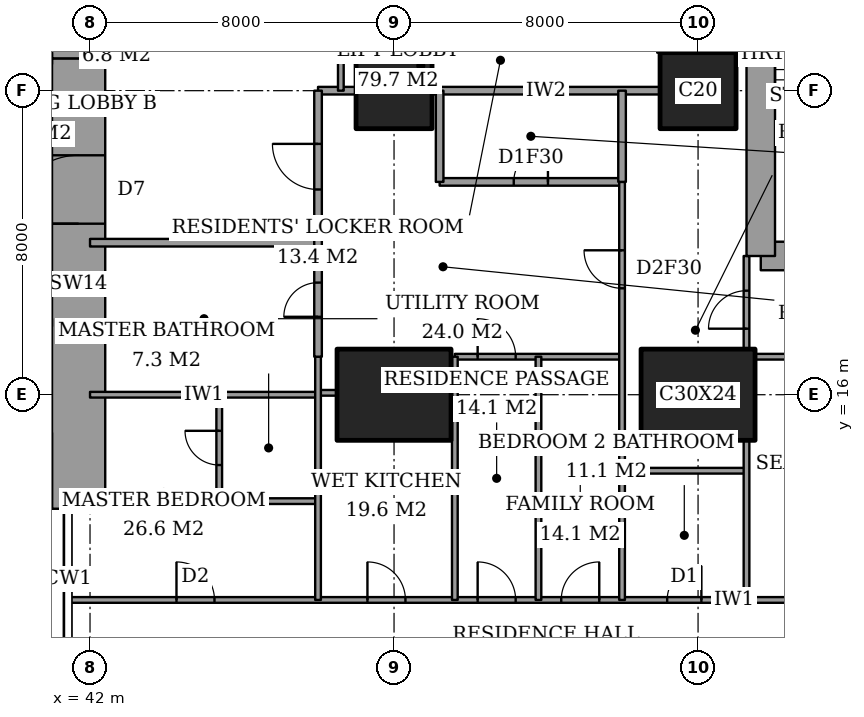
"""IFC4 building model, lengths in metres.
Left out: names, types, materials, properties, quantities, classifications, styles, units other than length and angle.
Written with IfcOpenShell. Run it as: python <this file> out.ifc"""

import sys

from ifc_helpers import new_model, si_unit, direction, frame, frame_2d, origin, origin_2d, place, context, subcontext, project, spatial, rectangle, extrude, element, fill, save


model = new_model("IFC4")
c1 = context("Model", 3, precision=1e-05, world=origin(), true_north=direction((0.0, 1.0)))
c2 = subcontext(c1, "Body", "Model", "MODEL_VIEW")
j1 = project(units=[si_unit("LENGTHUNIT", "METRE"), si_unit("PLANEANGLEUNIT", "RADIAN")], contexts=[c1])
p1 = place(None, origin())
s1 = spatial("IfcSite", under=j1, at=p1, CompositionType="ELEMENT")
p2 = place(p1, origin())
s2 = spatial("IfcBuilding", under=s1, at=p2, CompositionType="ELEMENT")
p3 = place(p2, frame((0.0, 0.0, 80.0)))
s3 = spatial("IfcBuildingStorey", under=s2, at=p3, CompositionType="ELEMENT", Elevation=80.0)
p4 = place(p3, frame((50.0, 16.0, 0.0), z_axis=(0.0, 0.0, 1.0), x_axis=(1.0, 0.0, 0.0)))
e1 = element("IfcColumn", 1, at=p4, inside=s3, PredefinedType="COLUMN", context=c2, shape_type="SweptSolid", body=[
    extrude(rectangle(XDim=3.0, YDim=2.4, at=origin_2d()), origin(), (0.0, 0.0, 1.0), 3.6),
])
p5 = place(p3, frame((50.0, 24.0, 0.0), z_axis=(0.0, 0.0, 1.0), x_axis=(1.0, 0.0, 0.0)))
e2 = element("IfcColumn", 2, at=p5, inside=s3, PredefinedType="COLUMN", context=c2, shape_type="SweptSolid", body=[
    extrude(rectangle(XDim=2.0, YDim=2.0, at=origin_2d()), origin(), (0.0, 0.0, 1.0), 3.6),
])
p6 = place(p3, frame((58.0, 16.0, 0.0), z_axis=(0.0, 0.0, 1.0), x_axis=(1.0, 0.0, 0.0)))
e3 = element("IfcColumn", 3, at=p6, inside=s3, PredefinedType="COLUMN", context=c2, shape_type="SweptSolid", body=[
    extrude(rectangle(XDim=3.0, YDim=2.4, at=origin_2d()), origin(), (0.0, 0.0, 1.0), 3.6),
])
p7 = place(p3, frame((58.0, 24.0, 0.0), z_axis=(0.0, 0.0, 1.0), x_axis=(1.0, 0.0, 0.0)))
e4 = element("IfcColumn", 4, at=p7, inside=s3, PredefinedType="COLUMN", context=c2, shape_type="SweptSolid", body=[
    extrude(rectangle(XDim=2.0, YDim=2.0, at=origin_2d()), origin(), (0.0, 0.0, 1.0), 3.6),
])
p8 = place(p3, frame((41.7, 13.0, 0.0), z_axis=(0.0, 0.0, 1.0), x_axis=(0.0, 1.0, 0.0)))
e5 = element("IfcWall", 5, at=p8, inside=s3, PredefinedType="SHEAR", context=c2, shape_type="SweptSolid", body=[
    extrude(rectangle(XDim=11.85, YDim=1.4, at=frame_2d((5.925, 0.0))), origin(), (0.0, 0.0, 1.0), 3.6),
])
p9 = place(p8, frame((7.5, 0.0, 0.0)))
e6 = element("IfcOpeningElement", 6, at=p9, cuts=e5, PredefinedType="OPENING", context=c2, shape_type="SweptSolid", body=[
    extrude(rectangle(XDim=1.8, YDim=2.4, at=frame_2d((0.9, 1.2))), frame((0.0, 0.71, 0.0), z_axis=(0.0, -1.0, 0.0), x_axis=(1.0, 0.0, 0.0)), (0.0, 0.0, 1.0), 1.42),
])
p10 = place(p3, frame((41.7, 24.85, 0.0), z_axis=(0.0, 0.0, 1.0), x_axis=(0.0, 1.0, 0.0)))
e7 = element("IfcWall", 7, at=p10, inside=s3, PredefinedType="SHEAR", context=c2, shape_type="SweptSolid", body=[
    extrude(rectangle(XDim=10.15, YDim=1.4, at=frame_2d((5.075, 0.0))), origin(), (0.0, 0.0, 1.0), 3.6),
])
p11 = place(p3, frame((59.65, 19.65, 0.0), z_axis=(0.0, 0.0, 1.0), x_axis=(1.0, 0.0, 0.0)))
e8 = element("IfcWall", 8, at=p11, inside=s3, PredefinedType="SHEAR", context=c2, shape_type="SweptSolid", body=[
    extrude(rectangle(XDim=4.45, YDim=0.75, at=frame_2d((2.225, 0.0))), origin(), (0.0, 0.0, 1.0), 3.6),
])
p12 = place(p3, frame((59.65, 28.35, 0.0), z_axis=(0.0, 0.0, 1.0), x_axis=(0.0, -1.0, 0.0)))
e9 = element("IfcWall", 9, at=p12, inside=s3, PredefinedType="SHEAR", context=c2, shape_type="SweptSolid", body=[
    extrude(rectangle(XDim=8.7, YDim=0.75, at=frame_2d((4.35, 0.0))), origin(), (0.0, 0.0, 1.0), 3.6),
])
p13 = place(p12, frame((0.975, 0.0, 0.0)))
e10 = element("IfcOpeningElement", 10, at=p13, cuts=e9, PredefinedType="OPENING", context=c2, shape_type="SweptSolid", body=[
    extrude(rectangle(XDim=1.0, YDim=2.1, at=frame_2d((0.5, 1.05))), frame((0.0, 0.385, 0.0), z_axis=(0.0, -1.0, 0.0), x_axis=(1.0, 0.0, 0.0)), (0.0, 0.0, 1.0), 0.77),
])
p14 = place(p3, frame((41.439, 10.6, 0.0), z_axis=(0.0, 0.0, 1.0), x_axis=(1.0, 0.0, 0.0)))
e11 = element("IfcWall", 11, at=p14, inside=s3, PredefinedType="PARTITIONING", context=c2, shape_type="SweptSolid", body=[
    extrude(rectangle(XDim=25.011, YDim=0.15, at=frame_2d((12.505, 0.0))), origin(), (0.0, 0.0, 1.0), 3.35),
])
p15 = place(p14, frame((10.761, 0.0, 0.0)))
e12 = element("IfcOpeningElement", 12, at=p15, cuts=e11, PredefinedType="OPENING", context=c2, shape_type="SweptSolid", body=[
    extrude(rectangle(XDim=1.0, YDim=2.1, at=frame_2d((0.5, 1.05))), frame((0.0, 0.085, 0.0), z_axis=(0.0, -1.0, 0.0), x_axis=(1.0, 0.0, 0.0)), (0.0, 0.0, 1.0), 0.17),
])
p16 = place(p14, frame((20.924, 0.0, 0.0)))
e13 = element("IfcOpeningElement", 13, at=p16, cuts=e11, PredefinedType="OPENING", context=c2, shape_type="SweptSolid", body=[
    extrude(rectangle(XDim=1.0, YDim=2.1, at=frame_2d((0.5, 1.05))), frame((0.0, 0.085, 0.0), z_axis=(0.0, -1.0, 0.0), x_axis=(1.0, 0.0, 0.0)), (0.0, 0.0, 1.0), 0.17),
])
p17 = place(p14, frame((15.749, 0.0, 0.0)))
e14 = element("IfcOpeningElement", 14, at=p17, cuts=e11, PredefinedType="OPENING", context=c2, shape_type="SweptSolid", body=[
    extrude(rectangle(XDim=0.9, YDim=2.1, at=frame_2d((0.45, 1.05))), frame((0.0, 0.085, 0.0), z_axis=(0.0, -1.0, 0.0), x_axis=(1.0, 0.0, 0.0)), (0.0, 0.0, 1.0), 0.17),
])
p18 = place(p14, frame((12.961, 0.0, 0.0)))
e15 = element("IfcOpeningElement", 15, at=p18, cuts=e11, PredefinedType="OPENING", context=c2, shape_type="SweptSolid", body=[
    extrude(rectangle(XDim=1.0, YDim=2.1, at=frame_2d((0.5, 1.05))), frame((0.0, 0.085, 0.0), z_axis=(0.0, -1.0, 0.0), x_axis=(1.0, 0.0, 0.0)), (0.0, 0.0, 1.0), 0.17),
])
p19 = place(p14, frame((7.861, 0.0, 0.0)))
e16 = element("IfcOpeningElement", 16, at=p19, cuts=e11, PredefinedType="OPENING", context=c2, shape_type="SweptSolid", body=[
    extrude(rectangle(XDim=1.0, YDim=2.1, at=frame_2d((0.5, 1.05))), frame((0.0, 0.085, 0.0), z_axis=(0.0, -1.0, 0.0), x_axis=(1.0, 0.0, 0.0)), (0.0, 0.0, 1.0), 0.17),
])
p20 = place(p14, frame((2.836, 0.0, 0.0)))
e17 = element("IfcOpeningElement", 17, at=p20, cuts=e11, PredefinedType="OPENING", context=c2, shape_type="SweptSolid", body=[
    extrude(rectangle(XDim=1.0, YDim=2.1, at=frame_2d((0.5, 1.05))), frame((0.0, 0.085, 0.0), z_axis=(0.0, -1.0, 0.0), x_axis=(1.0, 0.0, 0.0)), (0.0, 0.0, 1.0), 0.17),
])
p21 = place(p3, frame((45.4, 13.2, 0.0), z_axis=(0.0, 0.0, 1.0), x_axis=(1.0, 0.0, 0.0)))
e18 = element("IfcWall", 18, at=p21, inside=s3, PredefinedType="PARTITIONING", context=c2, shape_type="SweptSolid", body=[
    extrude(rectangle(XDim=2.6, YDim=0.15, at=frame_2d((1.3, 0.0))), origin(), (0.0, 0.0, 1.0), 3.35),
])
p22 = place(p3, frame((56.0, 14.0, 0.0), z_axis=(0.0, 0.0, 1.0), x_axis=(1.0, 0.0, 0.0)))
e19 = element("IfcWall", 19, at=p22, inside=s3, PredefinedType="PARTITIONING", context=c2, shape_type="SweptSolid", body=[
    extrude(rectangle(XDim=3.275, YDim=0.15, at=frame_2d((1.637, 0.0))), origin(), (0.0, 0.0, 1.0), 3.35),
])
p23 = place(p3, frame((42.0, 16.0, 0.0), z_axis=(0.0, 0.0, 1.0), x_axis=(1.0, 0.0, 0.0)))
e20 = element("IfcWall", 20, at=p23, inside=s3, PredefinedType="PARTITIONING", context=c2, shape_type="SweptSolid", body=[
    extrude(rectangle(XDim=6.0, YDim=0.15, at=frame_2d((3.0, 0.0))), origin(), (0.0, 0.0, 1.0), 2.634),
])
p24 = place(p3, frame((48.0, 16.05, 0.0), z_axis=(0.0, 0.0, 1.0), x_axis=(1.0, 0.0, 0.0)))
e21 = element("IfcWall", 21, at=p24, inside=s3, PredefinedType="PARTITIONING", context=c2, shape_type="SweptSolid", body=[
    extrude(rectangle(XDim=0.5, YDim=0.15, at=frame_2d((0.25, 0.0))), origin(), (0.0, 0.0, 1.0), 2.634),
])
p25 = place(p3, frame((51.6, 17.0, 0.0), z_axis=(0.0, 0.0, 1.0), x_axis=(1.0, 0.0, 0.0)))
e22 = element("IfcWall", 22, at=p25, inside=s3, PredefinedType="PARTITIONING", context=c2, shape_type="SweptSolid", body=[
    extrude(rectangle(XDim=4.4, YDim=0.15, at=frame_2d((2.2, 0.0))), origin(), (0.0, 0.0, 1.0), 3.35),
])
p26 = place(p25, frame((0.6, 0.0, 0.0)))
e23 = element("IfcOpeningElement", 23, at=p26, cuts=e22, PredefinedType="OPENING", context=c2, shape_type="SweptSolid", body=[
    extrude(rectangle(XDim=1.0, YDim=2.1, at=frame_2d((0.5, 1.05))), frame((0.0, 0.085, 0.0), z_axis=(0.0, -1.0, 0.0), x_axis=(1.0, 0.0, 0.0)), (0.0, 0.0, 1.0), 0.17),
])
p27 = place(p3, frame((59.5, 17.0, 0.0), z_axis=(0.0, 0.0, 1.0), x_axis=(1.0, 0.0, 0.0)))
e24 = element("IfcWall", 24, at=p27, inside=s3, PredefinedType="PARTITIONING", context=c2, shape_type="SweptSolid", body=[
    extrude(rectangle(XDim=5.15, YDim=0.15, at=frame_2d((2.575, 0.0))), origin(), (0.0, 0.0, 1.0), 3.35),
])
p28 = place(p3, frame((42.0, 20.0, 0.0), z_axis=(0.0, 0.0, 1.0), x_axis=(1.0, 0.0, 0.0)))
e25 = element("IfcWall", 25, at=p28, inside=s3, PredefinedType="PARTITIONING", context=c2, shape_type="SweptSolid", body=[
    extrude(rectangle(XDim=6.0, YDim=0.2, at=frame_2d((3.0, 0.0))), origin(), (0.0, 0.0, 1.0), 3.35),
])
p29 = place(p3, frame((51.2, 21.6, 0.0), z_axis=(0.0, 0.0, 1.0), x_axis=(1.0, 0.0, 0.0)))
e26 = element("IfcWall", 26, at=p29, inside=s3, PredefinedType="PARTITIONING", context=c2, shape_type="SweptSolid", body=[
    extrude(rectangle(XDim=4.8, YDim=0.2, at=frame_2d((2.4, 0.0))), origin(), (0.0, 0.0, 1.0), 3.35),
])
p30 = place(p29, frame((1.95, 0.0, 0.0)))
e27 = element("IfcOpeningElement", 27, at=p30, cuts=e26, PredefinedType="OPENING", context=c2, shape_type="SweptSolid", body=[
    extrude(rectangle(XDim=0.9, YDim=2.1, at=frame_2d((0.45, 1.05))), frame((0.0, 0.11, 0.0), z_axis=(0.0, -1.0, 0.0), x_axis=(1.0, 0.0, 0.0)), (0.0, 0.0, 1.0), 0.22),
])
p31 = place(p3, frame((48.0, 24.0, 0.0), z_axis=(0.0, 0.0, 1.0), x_axis=(1.0, 0.0, 0.0)))
e28 = element("IfcWall", 28, at=p31, inside=s3, PredefinedType="PARTITIONING", context=c2, shape_type="SweptSolid", body=[
    extrude(rectangle(XDim=1.0, YDim=0.2, at=frame_2d((0.5, 0.0))), origin(), (0.0, 0.0, 1.0), 3.35),
])
p32 = place(p3, frame((51.0, 24.0, 0.0), z_axis=(0.0, 0.0, 1.0), x_axis=(1.0, 0.0, 0.0)))
e29 = element("IfcWall", 29, at=p32, inside=s3, PredefinedType="PARTITIONING", context=c2, shape_type="SweptSolid", body=[
    extrude(rectangle(XDim=6.0, YDim=0.2, at=frame_2d((3.0, 0.0))), origin(), (0.0, 0.0, 1.0), 3.35),
])
p33 = place(p3, frame((45.4, 13.2, 0.0), z_axis=(0.0, 0.0, 1.0), x_axis=(0.0, 1.0, 0.0)))
e30 = element("IfcWall", 30, at=p33, inside=s3, PredefinedType="PARTITIONING", context=c2, shape_type="SweptSolid", body=[
    extrude(rectangle(XDim=2.8, YDim=0.15, at=frame_2d((1.4, 0.0))), origin(), (0.0, 0.0, 1.0), 3.35),
])
p34 = place(p33, frame((0.95, 0.0, 0.0)))
e31 = element("IfcOpeningElement", 31, at=p34, cuts=e30, PredefinedType="OPENING", context=c2, shape_type="SweptSolid", body=[
    extrude(rectangle(XDim=0.9, YDim=2.1, at=frame_2d((0.45, 1.05))), frame((0.0, 0.085, 0.0), z_axis=(0.0, -1.0, 0.0), x_axis=(1.0, 0.0, 0.0)), (0.0, 0.0, 1.0), 0.17),
])
p35 = place(p3, frame((48.0, 17.0, 0.0), z_axis=(0.0, 0.0, 1.0), x_axis=(0.0, 1.0, 0.0)))
e32 = element("IfcWall", 32, at=p35, inside=s3, PredefinedType="PARTITIONING", context=c2, shape_type="SweptSolid", body=[
    extrude(rectangle(XDim=7.0, YDim=0.2, at=frame_2d((3.5, 0.0))), origin(), (0.0, 0.0, 1.0), 3.35),
])
p36 = place(p35, frame((4.4, 0.0, 0.0)))
e33 = element("IfcOpeningElement", 33, at=p36, cuts=e32, PredefinedType="OPENING", context=c2, shape_type="SweptSolid", body=[
    extrude(rectangle(XDim=1.2, YDim=2.4, at=frame_2d((0.6, 1.2))), frame((0.0, 0.11, 0.0), z_axis=(0.0, -1.0, 0.0), x_axis=(1.0, 0.0, 0.0)), (0.0, 0.0, 1.0), 0.22),
])
p37 = place(p35, frame((1.05, 0.0, 0.0)))
e34 = element("IfcOpeningElement", 34, at=p37, cuts=e32, PredefinedType="OPENING", context=c2, shape_type="SweptSolid", body=[
    extrude(rectangle(XDim=0.9, YDim=2.1, at=frame_2d((0.45, 1.05))), frame((0.0, 0.11, 0.0), z_axis=(0.0, -1.0, 0.0), x_axis=(1.0, 0.0, 0.0)), (0.0, 0.0, 1.0), 0.22),
])
p38 = place(p3, frame((48.0, 10.6, 0.0), z_axis=(0.0, 0.0, 1.0), x_axis=(0.0, 1.0, 0.0)))
e35 = element("IfcWall", 35, at=p38, inside=s3, PredefinedType="PARTITIONING", context=c2, shape_type="SweptSolid", body=[
    extrude(rectangle(XDim=6.4, YDim=0.15, at=frame_2d((3.2, 0.0))), origin(), (0.0, 0.0, 1.0), 3.35),
])
p39 = place(p3, frame((48.6, 24.0, 0.0), z_axis=(0.0, 0.0, 1.0), x_axis=(0.0, 1.0, 0.0)))
e36 = element("IfcWall", 36, at=p39, inside=s3, PredefinedType="PARTITIONING", context=c2, shape_type="SweptSolid", body=[
    extrude(rectangle(XDim=1.6, YDim=0.15, at=frame_2d((0.8, 0.0))), origin(), (0.0, 0.0, 1.0), 3.35),
])
p40 = place(p3, frame((51.2, 21.6, 0.0), z_axis=(0.0, 0.0, 1.0), x_axis=(0.0, 1.0, 0.0)))
e37 = element("IfcWall", 37, at=p40, inside=s3, PredefinedType="PARTITIONING", context=c2, shape_type="SweptSolid", body=[
    extrude(rectangle(XDim=2.4, YDim=0.2, at=frame_2d((1.2, 0.0))), origin(), (0.0, 0.0, 1.0), 3.35),
])
for number, where, z_axis, x_axis in (
    (38, (51.6, 10.6, 0.0), (0.0, 0.0, 1.0), (0.0, 1.0, 0.0)),
    (39, (53.8, 10.6, 0.0), (0.0, 0.0, 1.0), (0.0, 1.0, 0.0)),
):
    element("IfcWall", number, at=place(p3, frame(where, z_axis=z_axis, x_axis=x_axis)), inside=s3, PredefinedType="PARTITIONING", context=c2, shape_type="SweptSolid", body=[
        extrude(rectangle(XDim=6.4, YDim=0.15, at=frame_2d((3.2, 0.0))), origin(), (0.0, 0.0, 1.0), 3.35),
    ])
p41 = place(p3, frame((56.0, 21.6, 0.0), z_axis=(0.0, 0.0, 1.0), x_axis=(0.0, 1.0, 0.0)))
e40 = element("IfcWall", 40, at=p41, inside=s3, PredefinedType="PARTITIONING", context=c2, shape_type="SweptSolid", body=[
    extrude(rectangle(XDim=2.4, YDim=0.2, at=frame_2d((1.2, 0.0))), origin(), (0.0, 0.0, 1.0), 3.35),
])
p42 = place(p3, frame((56.0, 10.6, 0.0), z_axis=(0.0, 0.0, 1.0), x_axis=(0.0, 1.0, 0.0)))
e41 = element("IfcWall", 41, at=p42, inside=s3, PredefinedType="PARTITIONING", context=c2, shape_type="SweptSolid", body=[
    extrude(rectangle(XDim=11.0, YDim=0.15, at=frame_2d((5.5, 0.0))), origin(), (0.0, 0.0, 1.0), 3.35),
])
p43 = place(p42, frame((8.2, 0.0, 0.0)))
e42 = element("IfcOpeningElement", 42, at=p43, cuts=e41, PredefinedType="OPENING", context=c2, shape_type="SweptSolid", body=[
    extrude(rectangle(XDim=1.0, YDim=2.1, at=frame_2d((0.5, 1.05))), frame((0.0, 0.085, 0.0), z_axis=(0.0, -1.0, 0.0), x_axis=(1.0, 0.0, 0.0)), (0.0, 0.0, 1.0), 0.17),
])
p44 = place(p3, frame((59.275, 10.6, 0.0), z_axis=(0.0, 0.0, 1.0), x_axis=(0.0, 1.0, 0.0)))
e43 = element("IfcWall", 43, at=p44, inside=s3, PredefinedType="PARTITIONING", context=c2, shape_type="SweptSolid", body=[
    extrude(rectangle(XDim=4.2, YDim=0.15, at=frame_2d((2.1, 0.0))), origin(), (0.0, 0.0, 1.0), 3.35),
])
p45 = place(p3, frame((59.275, 17.2, 0.0), z_axis=(0.0, 0.0, 1.0), x_axis=(0.0, 1.0, 0.0)))
e44 = element("IfcWall", 44, at=p45, inside=s3, PredefinedType="PARTITIONING", context=c2, shape_type="SweptSolid", body=[
    extrude(rectangle(XDim=2.45, YDim=0.15, at=frame_2d((1.225, 0.0))), origin(), (0.0, 0.0, 1.0), 3.35),
])
p46 = place(p45, frame((0.538, 0.0, 0.0)))
e45 = element("IfcOpeningElement", 45, at=p46, cuts=e44, PredefinedType="OPENING", context=c2, shape_type="SweptSolid", body=[
    extrude(rectangle(XDim=1.0, YDim=2.1, at=frame_2d((0.5, 1.05))), frame((0.0, 0.085, 0.0), z_axis=(0.0, -1.0, 0.0), x_axis=(1.0, 0.0, 0.0)), (0.0, 0.0, 1.0), 0.17),
])
p47 = place(p3, frame((28.3, 17.9, 0.0), z_axis=(0.0, 0.0, 1.0), x_axis=(1.0, 0.0, 0.0)))
e46 = element("IfcWall", 46, at=p47, inside=s3, PredefinedType="PARTITIONING", context=c2, shape_type="SweptSolid", body=[
    extrude(rectangle(XDim=12.7, YDim=0.2, at=frame_2d((6.35, 0.0))), origin(), (0.0, 0.0, 1.0), 3.6),
])
p48 = place(p47, frame((0.95, 0.0, 0.0)))
e47 = element("IfcOpeningElement", 47, at=p48, cuts=e46, PredefinedType="OPENING", context=c2, shape_type="SweptSolid", body=[
    extrude(rectangle(XDim=1.1, YDim=2.1, at=frame_2d((0.55, 1.05))), frame((0.0, 0.11, 0.0), z_axis=(0.0, -1.0, 0.0), x_axis=(1.0, 0.0, 0.0)), (0.0, 0.0, 1.0), 0.22),
])
p49 = place(p47, frame((4.15, 0.0, 0.0)))
e48 = element("IfcOpeningElement", 48, at=p49, cuts=e46, PredefinedType="OPENING", context=c2, shape_type="SweptSolid", body=[
    extrude(rectangle(XDim=1.1, YDim=2.1, at=frame_2d((0.55, 1.05))), frame((0.0, 0.11, 0.0), z_axis=(0.0, -1.0, 0.0), x_axis=(1.0, 0.0, 0.0)), (0.0, 0.0, 1.0), 0.22),
])
p50 = place(p47, frame((7.35, 0.0, 0.0)))
e49 = element("IfcOpeningElement", 49, at=p50, cuts=e46, PredefinedType="OPENING", context=c2, shape_type="SweptSolid", body=[
    extrude(rectangle(XDim=1.1, YDim=2.1, at=frame_2d((0.55, 1.05))), frame((0.0, 0.11, 0.0), z_axis=(0.0, -1.0, 0.0), x_axis=(1.0, 0.0, 0.0)), (0.0, 0.0, 1.0), 0.22),
])
p51 = place(p47, frame((10.6, 0.0, 0.0)))
e50 = element("IfcOpeningElement", 50, at=p51, cuts=e46, PredefinedType="OPENING", context=c2, shape_type="SweptSolid", body=[
    extrude(rectangle(XDim=1.2, YDim=2.1, at=frame_2d((0.6, 1.05))), frame((0.0, 0.11, 0.0), z_axis=(0.0, -1.0, 0.0), x_axis=(1.0, 0.0, 0.0)), (0.0, 0.0, 1.0), 0.22),
])
p52 = place(p15, origin())
e51 = element("IfcDoor", 51, at=p52, inside=s3, OperationType="SINGLE_SWING_RIGHT", PredefinedType="DOOR", context=c2, shape_type="SweptSolid", body=[
    extrude(rectangle(XDim=1.0, YDim=2.1, at=frame_2d((0.5, 1.05))), frame((0.0, 0.025, 0.0), z_axis=(0.0, -1.0, 0.0), x_axis=(1.0, 0.0, 0.0)), (0.0, 0.0, 1.0), 0.05),
])
fill(e12, e51)
p53 = place(p46, origin())
e52 = element("IfcDoor", 52, at=p53, inside=s3, OperationType="SINGLE_SWING_RIGHT", PredefinedType="DOOR", context=c2, shape_type="SweptSolid", body=[
    extrude(rectangle(XDim=1.0, YDim=2.1, at=frame_2d((0.5, 1.05))), frame((0.0, 0.025, 0.0), z_axis=(0.0, -1.0, 0.0), x_axis=(1.0, 0.0, 0.0)), (0.0, 0.0, 1.0), 0.05),
])
fill(e45, e52)
p54 = place(p17, origin())
e53 = element("IfcDoor", 53, at=p54, inside=s3, OperationType="SINGLE_SWING_LEFT", PredefinedType="DOOR", context=c2, shape_type="SweptSolid", body=[
    extrude(rectangle(XDim=0.9, YDim=2.1, at=frame_2d((0.45, 1.05))), frame((0.0, 0.025, 0.0), z_axis=(0.0, -1.0, 0.0), x_axis=(1.0, 0.0, 0.0)), (0.0, 0.0, 1.0), 0.05),
])
fill(e14, e53)
p55 = place(p43, origin())
e54 = element("IfcDoor", 54, at=p55, inside=s3, OperationType="SINGLE_SWING_LEFT", PredefinedType="DOOR", context=c2, shape_type="SweptSolid", body=[
    extrude(rectangle(XDim=1.0, YDim=2.1, at=frame_2d((0.5, 1.05))), frame((0.0, 0.025, 0.0), z_axis=(0.0, -1.0, 0.0), x_axis=(1.0, 0.0, 0.0)), (0.0, 0.0, 1.0), 0.05),
])
fill(e42, e54)
p56 = place(p30, origin())
e55 = element("IfcDoor", 55, at=p56, inside=s3, OperationType="SINGLE_SWING_LEFT", PredefinedType="DOOR", context=c2, shape_type="SweptSolid", body=[
    extrude(rectangle(XDim=0.9, YDim=2.1, at=frame_2d((0.45, 1.05))), frame((0.0, 0.025, 0.0), z_axis=(0.0, -1.0, 0.0), x_axis=(1.0, 0.0, 0.0)), (0.0, 0.0, 1.0), 0.05),
])
fill(e27, e55)
p57 = place(p36, origin())
e56 = element("IfcDoor", 56, at=p57, inside=s3, OperationType="SINGLE_SWING_LEFT", PredefinedType="DOOR", context=c2, shape_type="SweptSolid", body=[
    extrude(rectangle(XDim=1.2, YDim=2.4, at=frame_2d((0.6, 1.2))), frame((0.0, 0.025, 0.0), z_axis=(0.0, -1.0, 0.0), x_axis=(1.0, 0.0, 0.0)), (0.0, 0.0, 1.0), 0.05),
])
fill(e33, e56)
p58 = place(p18, origin())
e57 = element("IfcDoor", 57, at=p58, inside=s3, OperationType="SINGLE_SWING_LEFT", PredefinedType="DOOR", context=c2, shape_type="SweptSolid", body=[
    extrude(rectangle(XDim=1.0, YDim=2.1, at=frame_2d((0.5, 1.05))), frame((0.0, 0.025, 0.0), z_axis=(0.0, -1.0, 0.0), x_axis=(1.0, 0.0, 0.0)), (0.0, 0.0, 1.0), 0.05),
])
fill(e15, e57)
p59 = place(p26, origin())
e58 = element("IfcDoor", 58, at=p59, inside=s3, OperationType="SINGLE_SWING_RIGHT", PredefinedType="DOOR", context=c2, shape_type="SweptSolid", body=[
    extrude(rectangle(XDim=1.0, YDim=2.1, at=frame_2d((0.5, 1.05))), frame((0.0, 0.025, 0.0), z_axis=(0.0, -1.0, 0.0), x_axis=(1.0, 0.0, 0.0)), (0.0, 0.0, 1.0), 0.05),
])
fill(e23, e58)
p60 = place(p19, origin())
e59 = element("IfcDoor", 59, at=p60, inside=s3, OperationType="SINGLE_SWING_RIGHT", PredefinedType="DOOR", context=c2, shape_type="SweptSolid", body=[
    extrude(rectangle(XDim=1.0, YDim=2.1, at=frame_2d((0.5, 1.05))), frame((0.0, 0.025, 0.0), z_axis=(0.0, -1.0, 0.0), x_axis=(1.0, 0.0, 0.0)), (0.0, 0.0, 1.0), 0.05),
])
fill(e16, e59)
p61 = place(p34, origin())
e60 = element("IfcDoor", 60, at=p61, inside=s3, OperationType="SINGLE_SWING_LEFT", PredefinedType="DOOR", context=c2, shape_type="SweptSolid", body=[
    extrude(rectangle(XDim=0.9, YDim=2.1, at=frame_2d((0.45, 1.05))), frame((0.0, 0.025, 0.0), z_axis=(0.0, -1.0, 0.0), x_axis=(1.0, 0.0, 0.0)), (0.0, 0.0, 1.0), 0.05),
])
fill(e31, e60)
p62 = place(p20, origin())
e61 = element("IfcDoor", 61, at=p62, inside=s3, OperationType="SINGLE_SWING_RIGHT", PredefinedType="DOOR", context=c2, shape_type="SweptSolid", body=[
    extrude(rectangle(XDim=1.0, YDim=2.1, at=frame_2d((0.5, 1.05))), frame((0.0, 0.025, 0.0), z_axis=(0.0, -1.0, 0.0), x_axis=(1.0, 0.0, 0.0)), (0.0, 0.0, 1.0), 0.05),
])
fill(e17, e61)
p63 = place(p37, origin())
e62 = element("IfcDoor", 62, at=p63, inside=s3, OperationType="SINGLE_SWING_RIGHT", PredefinedType="DOOR", context=c2, shape_type="SweptSolid", body=[
    extrude(rectangle(XDim=0.9, YDim=2.1, at=frame_2d((0.45, 1.05))), frame((0.0, 0.025, 0.0), z_axis=(0.0, -1.0, 0.0), x_axis=(1.0, 0.0, 0.0)), (0.0, 0.0, 1.0), 0.05),
])
fill(e34, e62)
p64 = place(p9, origin())
e63 = element("IfcDoor", 63, at=p64, inside=s3, OperationType="DOUBLE_DOOR_DOUBLE_SWING", PredefinedType="DOOR", context=c2, shape_type="SweptSolid", body=[
    extrude(rectangle(XDim=1.8, YDim=2.4, at=frame_2d((0.9, 1.2))), frame((0.0, 0.025, 0.0), z_axis=(0.0, -1.0, 0.0), x_axis=(1.0, 0.0, 0.0)), (0.0, 0.0, 1.0), 0.05),
])
fill(e6, e63)
save(model, sys.argv[1])
